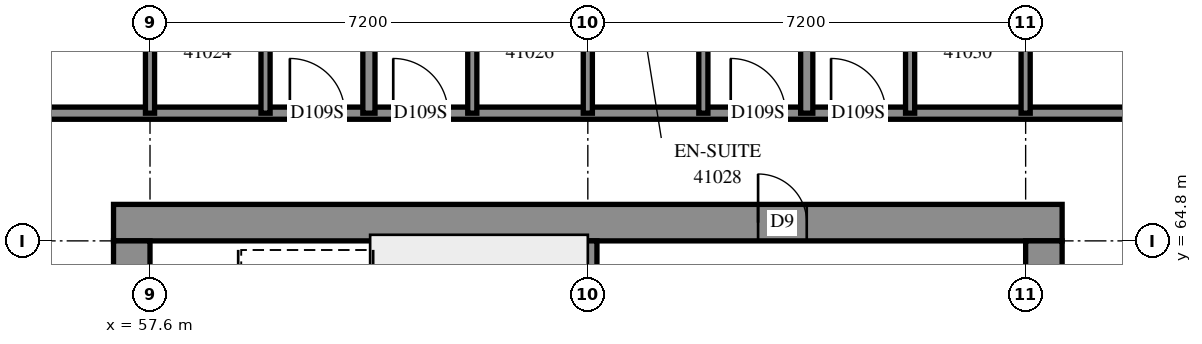
"""IFC4 building model, lengths in metres.
Left out: names, types, materials, properties, quantities, classifications, styles, units other than length and angle.
Written with IfcOpenShell. Run it as: python <this file> out.ifc"""

import sys

from ifc_helpers import new_model, si_unit, direction, frame, frame_2d, origin, place, context, subcontext, project, spatial, rectangle, extrude, element, fill, save


model = new_model("IFC4")
c1 = context("Model", 3, precision=1e-05, world=origin(), true_north=direction((0.0, 1.0)))
c2 = subcontext(c1, "Body", "Model", "MODEL_VIEW")
j1 = project(units=[si_unit("LENGTHUNIT", "METRE"), si_unit("PLANEANGLEUNIT", "RADIAN")], contexts=[c1])
p1 = place(None, origin())
s1 = spatial("IfcSite", under=j1, at=p1, CompositionType="ELEMENT")
p2 = place(p1, origin())
s2 = spatial("IfcBuilding", under=s1, at=p2, CompositionType="ELEMENT")
p3 = place(p2, frame((0.0, 0.0, 152.4)))
s3 = spatial("IfcBuildingStorey", under=s2, at=p3, CompositionType="ELEMENT", Elevation=152.4)
p4 = place(p3, frame((57.0, 65.1, -0.3), z_axis=(0.0, 0.0, 1.0), x_axis=(1.0, 0.0, 0.0)))
e1 = element("IfcWall", 1, at=p4, inside=s3, PredefinedType="SHEAR", context=c2, shape_type="SweptSolid", body=[
    extrude(rectangle(XDim=15.6, YDim=0.6, at=frame_2d((7.8, 0.0))), origin(), (0.0, 0.0, 1.0), 2.7),
])
p5 = place(p4, frame((10.6, 0.0, 0.3)))
e2 = element("IfcOpeningElement", 2, at=p5, cuts=e1, PredefinedType="OPENING", context=c2, shape_type="SweptSolid", body=[
    extrude(rectangle(XDim=0.8, YDim=2.1, at=frame_2d((0.4, 1.05))), frame((0.0, 0.31, 0.0), z_axis=(0.0, -1.0, 0.0), x_axis=(1.0, 0.0, 0.0)), (0.0, 0.0, 1.0), 0.62),
])
p6 = place(p3, frame((57.3, 50.4, -0.3), z_axis=(0.0, 0.0, 1.0), x_axis=(0.0, 1.0, 0.0)))
e3 = element("IfcWall", 3, at=p6, inside=s3, PredefinedType="SHEAR", context=c2, shape_type="SweptSolid", body=[
    extrude(rectangle(XDim=14.4, YDim=0.6, at=frame_2d((7.2, 0.0))), origin(), (0.0, 0.0, 1.0), 2.7),
])
p7 = place(p6, frame((4.55, 0.0, 0.3)))
e4 = element("IfcOpeningElement", 4, at=p7, cuts=e3, PredefinedType="OPENING", context=c2, shape_type="SweptSolid", body=[
    extrude(rectangle(XDim=1.1, YDim=2.1, at=frame_2d((0.55, 1.05))), frame((0.0, 0.31, 0.0), z_axis=(0.0, -1.0, 0.0), x_axis=(1.0, 0.0, 0.0)), (0.0, 0.0, 1.0), 0.62),
])
p8 = place(p6, frame((11.35, 0.0, 0.3)))
e5 = element("IfcOpeningElement", 5, at=p8, cuts=e3, PredefinedType="OPENING", context=c2, shape_type="SweptSolid", body=[
    extrude(rectangle(XDim=1.1, YDim=2.1, at=frame_2d((0.55, 1.05))), frame((0.0, 0.31, 0.0), z_axis=(0.0, -1.0, 0.0), x_axis=(1.0, 0.0, 0.0)), (0.0, 0.0, 1.0), 0.62),
])
p9 = place(p3, frame((72.3, 50.4, -0.3), z_axis=(0.0, 0.0, 1.0), x_axis=(0.0, 1.0, 0.0)))
e6 = element("IfcWall", 6, at=p9, inside=s3, PredefinedType="SHEAR", context=c2, shape_type="SweptSolid", body=[
    extrude(rectangle(XDim=14.4, YDim=0.6, at=frame_2d((7.2, 0.0))), origin(), (0.0, 0.0, 1.0), 2.7),
])
p10 = place(p9, frame((4.55, 0.0, 0.3)))
e7 = element("IfcOpeningElement", 7, at=p10, cuts=e6, PredefinedType="OPENING", context=c2, shape_type="SweptSolid", body=[
    extrude(rectangle(XDim=1.1, YDim=2.1, at=frame_2d((0.55, 1.05))), frame((0.0, 0.31, 0.0), z_axis=(0.0, -1.0, 0.0), x_axis=(1.0, 0.0, 0.0)), (0.0, 0.0, 1.0), 0.62),
])
p11 = place(p9, frame((11.35, 0.0, 0.3)))
e8 = element("IfcOpeningElement", 8, at=p11, cuts=e6, PredefinedType="OPENING", context=c2, shape_type="SweptSolid", body=[
    extrude(rectangle(XDim=1.1, YDim=2.1, at=frame_2d((0.55, 1.05))), frame((0.0, 0.31, 0.0), z_axis=(0.0, -1.0, 0.0), x_axis=(1.0, 0.0, 0.0)), (0.0, 0.0, 1.0), 0.62),
])
p12 = place(p3, frame((64.8, 60.6, 0.0), z_axis=(0.0, 0.0, 1.0), x_axis=(0.0, 1.0, 0.0)))
e9 = element("IfcWall", 9, at=p12, inside=s3, PredefinedType="SOLIDWALL", context=c2, shape_type="SweptSolid", body=[
    extrude(rectangle(XDim=4.2, YDim=0.3, at=frame_2d((2.1, 0.0))), origin(), (0.0, 0.0, 1.0), 3.1),
])
p13 = place(p3, frame((55.5, 66.9, 0.0), z_axis=(0.0, 0.0, 1.0), x_axis=(1.0, 0.0, 0.0)))
e10 = element("IfcWall", 10, at=p13, inside=s3, PredefinedType="PARTITIONING", context=c2, shape_type="SweptSolid", body=[
    extrude(rectangle(XDim=18.6, YDim=0.2, at=frame_2d((9.3, 0.0))), origin(), (0.0, 0.0, 1.0), 3.1),
])
p14 = place(p13, frame((4.4, 0.0, 0.0)))
e11 = element("IfcOpeningElement", 11, at=p14, cuts=e10, PredefinedType="OPENING", context=c2, shape_type="SweptSolid", body=[
    extrude(rectangle(XDim=0.9, YDim=2.1, at=frame_2d((0.45, 1.05))), frame((0.0, 0.11, 0.0), z_axis=(0.0, -1.0, 0.0), x_axis=(1.0, 0.0, 0.0)), (0.0, 0.0, 1.0), 0.22),
])
p15 = place(p13, frame((6.1, 0.0, 0.0)))
e12 = element("IfcOpeningElement", 12, at=p15, cuts=e10, PredefinedType="OPENING", context=c2, shape_type="SweptSolid", body=[
    extrude(rectangle(XDim=0.9, YDim=2.1, at=frame_2d((0.45, 1.05))), frame((0.0, 0.11, 0.0), z_axis=(0.0, -1.0, 0.0), x_axis=(1.0, 0.0, 0.0)), (0.0, 0.0, 1.0), 0.22),
])
p16 = place(p13, frame((11.65, 0.0, 0.0)))
e13 = element("IfcOpeningElement", 13, at=p16, cuts=e10, PredefinedType="OPENING", context=c2, shape_type="SweptSolid", body=[
    extrude(rectangle(XDim=0.9, YDim=2.1, at=frame_2d((0.45, 1.05))), frame((0.0, 0.11, 0.0), z_axis=(0.0, -1.0, 0.0), x_axis=(1.0, 0.0, 0.0)), (0.0, 0.0, 1.0), 0.22),
])
p17 = place(p13, frame((13.3, 0.0, 0.0)))
e14 = element("IfcOpeningElement", 14, at=p17, cuts=e10, PredefinedType="OPENING", context=c2, shape_type="SweptSolid", body=[
    extrude(rectangle(XDim=0.9, YDim=2.1, at=frame_2d((0.45, 1.05))), frame((0.0, 0.11, 0.0), z_axis=(0.0, -1.0, 0.0), x_axis=(1.0, 0.0, 0.0)), (0.0, 0.0, 1.0), 0.22),
])
p18 = place(p3, frame((68.4, 66.9, 0.0), z_axis=(0.0, 0.0, 1.0), x_axis=(0.0, 1.0, 0.0)))
e15 = element("IfcWall", 15, at=p18, inside=s3, PredefinedType="PARTITIONING", context=c2, shape_type="SweptSolid", body=[
    extrude(rectangle(XDim=5.836, YDim=0.2, at=frame_2d((2.918, 0.0))), origin(), (0.0, 0.0, 1.0), 3.1),
])
p19 = place(p3, frame((61.2, 66.9, 0.0), z_axis=(0.0, 0.0, 1.0), x_axis=(0.0, 1.0, 0.0)))
e16 = element("IfcWall", 16, at=p19, inside=s3, PredefinedType="PARTITIONING", context=c2, shape_type="SweptSolid", body=[
    extrude(rectangle(XDim=5.804, YDim=0.2, at=frame_2d((2.902, 0.0))), origin(), (0.0, 0.0, 1.0), 3.1),
])
for number, where, z_axis, x_axis in (
    (17, (59.5, 66.9, 0.0), (0.0, 0.0, 1.0), (0.0, 1.0, 0.0)),
    (18, (57.6, 66.9, 0.0), (0.0, 0.0, 1.0), (0.0, 1.0, 0.0)),
    (19, (62.9, 66.9, 0.0), (0.0, 0.0, 1.0), (0.0, 1.0, 0.0)),
    (20, (64.8, 66.9, 0.0), (0.0, 0.0, 1.0), (0.0, 1.0, 0.0)),
    (21, (66.7, 66.9, 0.0), (0.0, 0.0, 1.0), (0.0, 1.0, 0.0)),
    (22, (70.1, 66.9, 0.0), (0.0, 0.0, 1.0), (0.0, 1.0, 0.0)),
    (23, (72.0, 66.9, 0.0), (0.0, 0.0, 1.0), (0.0, 1.0, 0.0)),
):
    element("IfcWall", number, at=place(p3, frame(where, z_axis=z_axis, x_axis=x_axis)), inside=s3, PredefinedType="PARTITIONING", context=c2, shape_type="SweptSolid", body=[
        extrude(rectangle(XDim=2.4, YDim=0.15, at=frame_2d((1.2, 0.0))), origin(), (0.0, 0.0, 1.0), 3.1),
    ])
p20 = place(p5, origin())
e24 = element("IfcDoor", 24, at=p20, inside=s3, OperationType="SINGLE_SWING_RIGHT", PredefinedType="DOOR", context=c2, shape_type="SweptSolid", body=[
    extrude(rectangle(XDim=0.8, YDim=2.1, at=frame_2d((0.4, 1.05))), frame((0.0, 0.025, 0.0), z_axis=(0.0, -1.0, 0.0), x_axis=(1.0, 0.0, 0.0)), (0.0, 0.0, 1.0), 0.05),
])
fill(e2, e24)
p21 = place(p14, origin())
e25 = element("IfcDoor", 25, at=p21, inside=s3, OperationType="SINGLE_SWING_RIGHT", PredefinedType="DOOR", context=c2, shape_type="SweptSolid", body=[
    extrude(rectangle(XDim=0.9, YDim=2.1, at=frame_2d((0.45, 1.05))), frame((0.0, 0.025, 0.0), z_axis=(0.0, -1.0, 0.0), x_axis=(1.0, 0.0, 0.0)), (0.0, 0.0, 1.0), 0.05),
])
fill(e11, e25)
p22 = place(p15, origin())
e26 = element("IfcDoor", 26, at=p22, inside=s3, OperationType="SINGLE_SWING_LEFT", PredefinedType="DOOR", context=c2, shape_type="SweptSolid", body=[
    extrude(rectangle(XDim=0.9, YDim=2.1, at=frame_2d((0.45, 1.05))), frame((0.0, 0.025, 0.0), z_axis=(0.0, -1.0, 0.0), x_axis=(1.0, 0.0, 0.0)), (0.0, 0.0, 1.0), 0.05),
])
fill(e12, e26)
p23 = place(p16, origin())
e27 = element("IfcDoor", 27, at=p23, inside=s3, OperationType="SINGLE_SWING_RIGHT", PredefinedType="DOOR", context=c2, shape_type="SweptSolid", body=[
    extrude(rectangle(XDim=0.9, YDim=2.1, at=frame_2d((0.45, 1.05))), frame((0.0, 0.025, 0.0), z_axis=(0.0, -1.0, 0.0), x_axis=(1.0, 0.0, 0.0)), (0.0, 0.0, 1.0), 0.05),
])
fill(e13, e27)
p24 = place(p17, origin())
e28 = element("IfcDoor", 28, at=p24, inside=s3, OperationType="SINGLE_SWING_LEFT", PredefinedType="DOOR", context=c2, shape_type="SweptSolid", body=[
    extrude(rectangle(XDim=0.9, YDim=2.1, at=frame_2d((0.45, 1.05))), frame((0.0, 0.025, 0.0), z_axis=(0.0, -1.0, 0.0), x_axis=(1.0, 0.0, 0.0)), (0.0, 0.0, 1.0), 0.05),
])
fill(e14, e28)
save(model, sys.argv[1])
